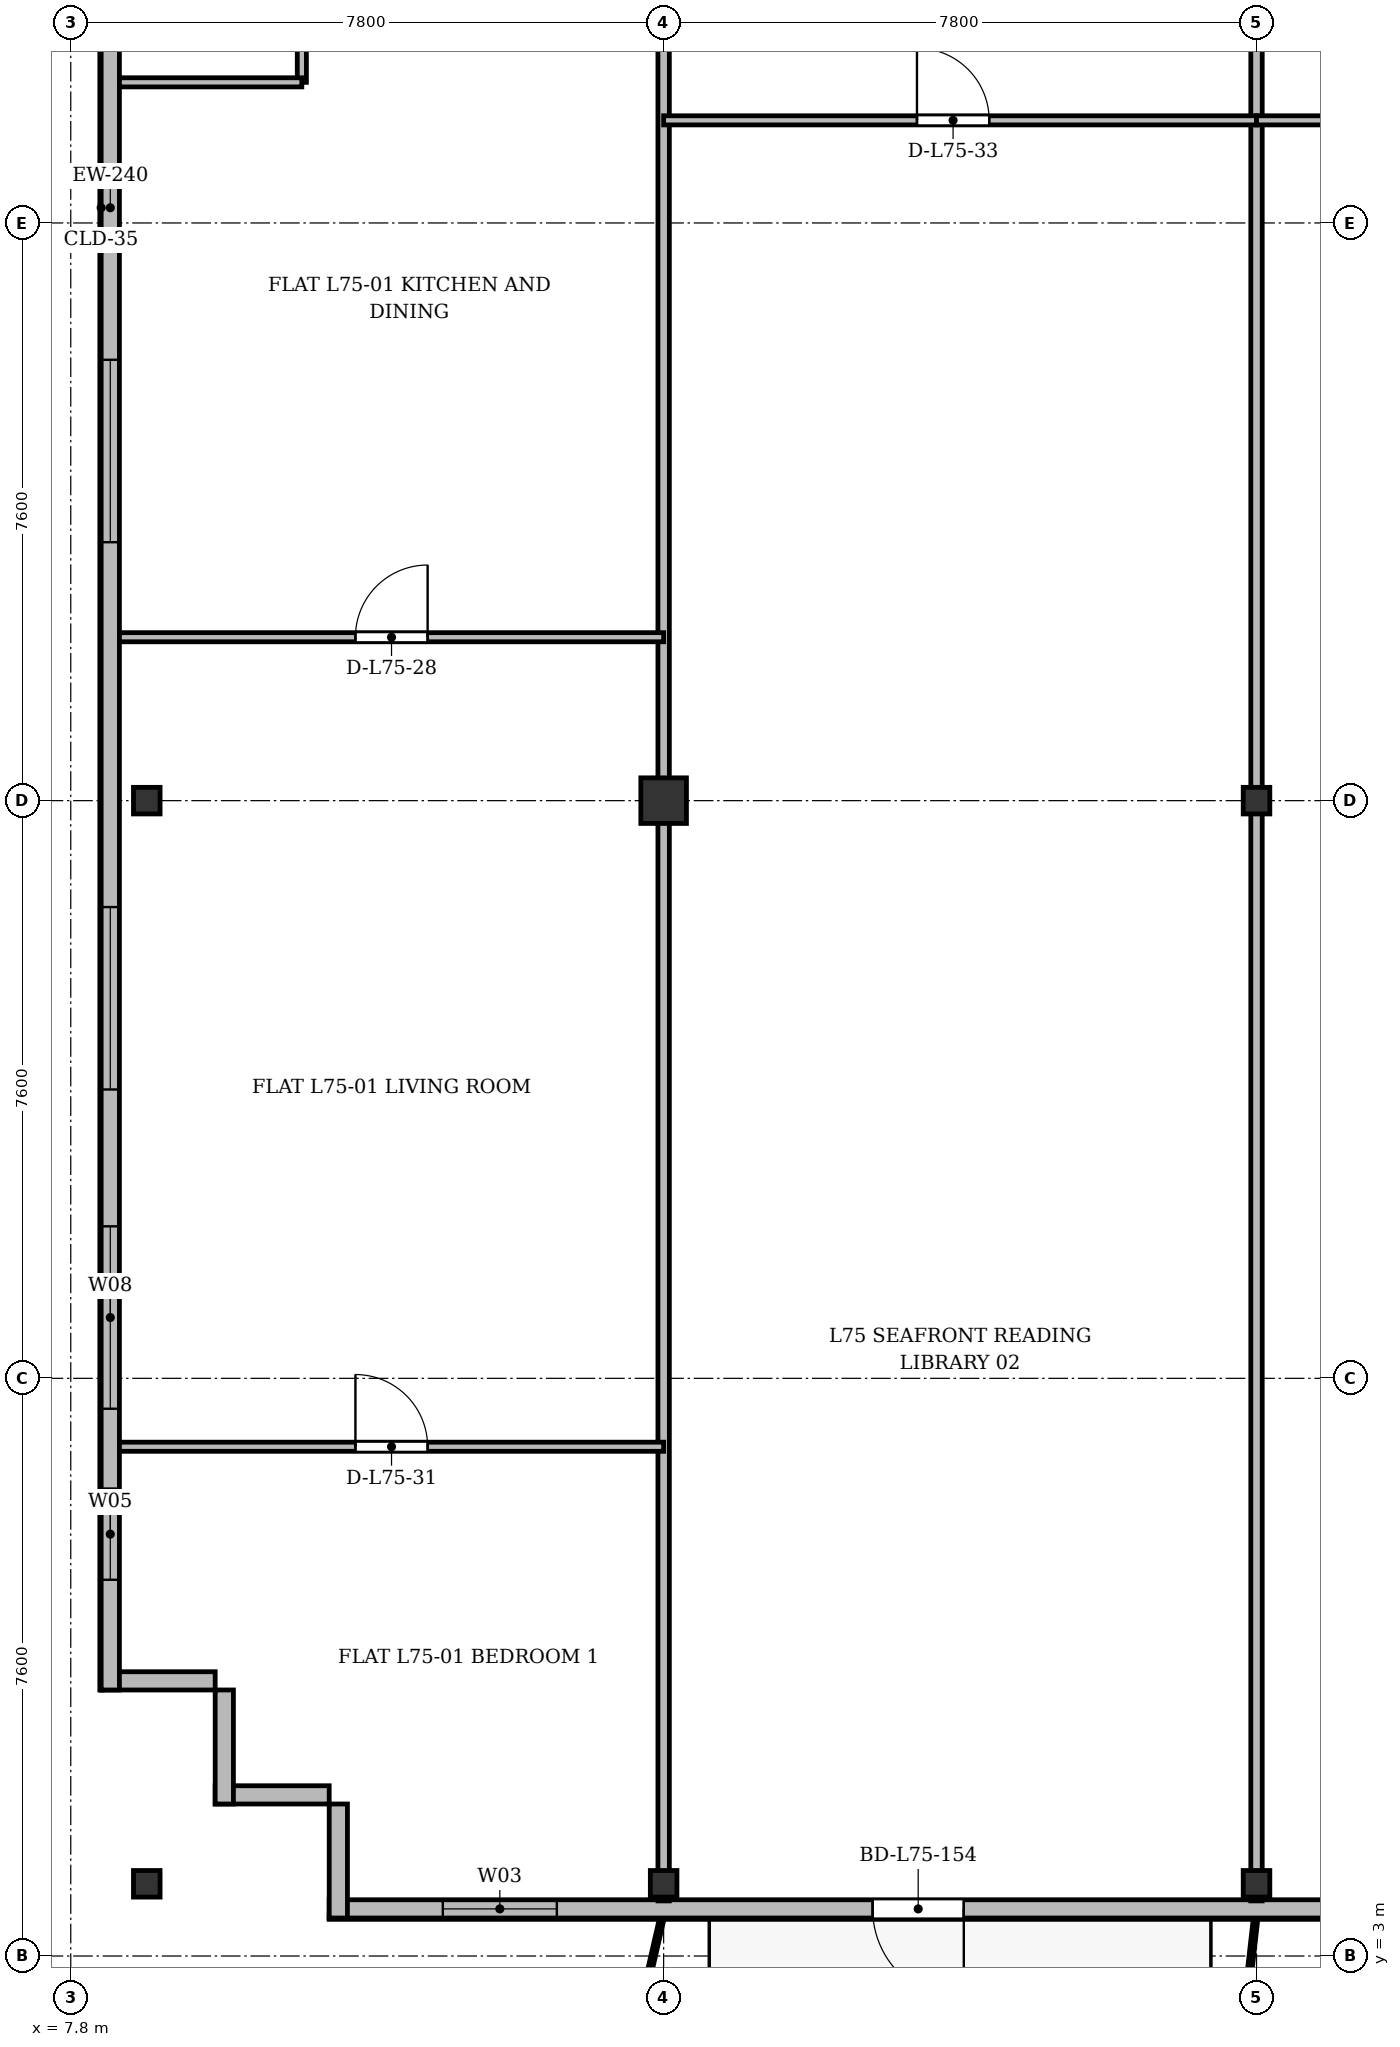
"""IFC4 building model, lengths in metres.
Left out: names, types, materials, properties, quantities, classifications, styles, units other than length and angle.
Written with IfcOpenShell. Run it as: python <this file> out.ifc"""

import sys

from ifc_helpers import new_model, si_unit, direction, frame, frame_2d, origin, origin_2d, place, context, subcontext, project, spatial, rectangle, i_section, extrude, source, transform, mapped, element, fill, save


model = new_model("IFC4")
c1 = context("Model", 3, precision=1e-05, world=origin(), true_north=direction((0.0, 1.0)))
c2 = subcontext(c1, "Body", "Model", "MODEL_VIEW")
j1 = project(units=[si_unit("LENGTHUNIT", "METRE"), si_unit("PLANEANGLEUNIT", "RADIAN")], contexts=[c1])
p1 = place(None, origin())
s1 = spatial("IfcSite", under=j1, at=p1, CompositionType="ELEMENT")
p2 = place(p1, origin())
s2 = spatial("IfcBuilding", under=s1, at=p2, CompositionType="ELEMENT")
p3 = place(p2, frame((0.0, 0.0, 288.3)))
s3 = spatial("IfcBuildingStorey", under=s2, at=p3, CompositionType="ELEMENT", Elevation=288.3)
m1 = source(origin(), c2, "Body", "SweptSolid", [
    extrude(i_section(OverallWidth=0.35, OverallDepth=0.35, WebThickness=0.018, FlangeThickness=0.028, at=origin_2d()), origin(), (0.0, 0.0, 1.0), 3.6),
])
for number, where, z_axis, x_axis in (
    (1, (8.8, 3.95, 0.0), (0.0, 0.0, 1.0), (1.0, 0.0, 0.0)),
    (2, (8.8, 18.2, 0.0), (0.0, 0.0, 1.0), (1.0, 0.0, 0.0)),
    (3, (15.6, 3.95, 0.0), (0.0, 0.0, 1.0), (1.0, 0.0, 0.0)),
):
    element("IfcColumn", number, at=place(p3, frame(where, z_axis=z_axis, x_axis=x_axis)), inside=s3, PredefinedType="COLUMN", context=c2, shape_type="MappedRepresentation", body=[
        mapped(m1, transform((0.0, 0.0, 0.0), x_axis=(1.0, 0.0, 0.0), y_axis=(0.0, 1.0, 0.0), z_axis=(0.0, 0.0, 1.0), scale=1.0)),
    ])
m2 = source(origin(), c2, "Body", "SweptSolid", [
    extrude(rectangle(XDim=0.6, YDim=0.6, at=origin_2d()), origin(), (0.0, 0.0, 1.0), 3.6),
])
p4 = place(p3, frame((15.6, 18.2, 0.0), z_axis=(0.0, 0.0, 1.0), x_axis=(1.0, 0.0, 0.0)))
e4 = element("IfcColumn", 4, at=p4, inside=s3, PredefinedType="COLUMN", context=c2, shape_type="MappedRepresentation", body=[
    mapped(m2, transform((0.0, 0.0, 0.0), x_axis=(1.0, 0.0, 0.0), y_axis=(0.0, 1.0, 0.0), z_axis=(0.0, 0.0, 1.0), scale=1.0)),
])
for number, where, z_axis, x_axis in (
    (5, (23.4, 3.95, 0.0), (0.0, 0.0, 1.0), (1.0, 0.0, 0.0)),
    (6, (23.4, 18.2, 0.0), (0.0, 0.0, 1.0), (1.0, 0.0, 0.0)),
):
    element("IfcColumn", number, at=place(p3, frame(where, z_axis=z_axis, x_axis=x_axis)), inside=s3, PredefinedType="COLUMN", context=c2, shape_type="MappedRepresentation", body=[
        mapped(m1, transform((0.0, 0.0, 0.0), x_axis=(1.0, 0.0, 0.0), y_axis=(0.0, 1.0, 0.0), z_axis=(0.0, 0.0, 1.0), scale=1.0)),
    ])
for number, where, z_axis, x_axis in (
    (7, (11.2, 5.12, 0.0), (0.0, 0.0, 1.0), (-1.0, 0.0, 0.0)),
    (8, (9.82, 5.0, 0.0), (0.0, 0.0, 1.0), (0.0, 1.0, 0.0)),
):
    element("IfcWall", number, at=place(p3, frame(where, z_axis=z_axis, x_axis=x_axis)), inside=s3, PredefinedType="SOLIDWALL", context=c2, shape_type="SweptSolid", body=[
        extrude(rectangle(XDim=1.5, YDim=0.24, at=frame_2d((0.75, 0.0))), origin(), (0.0, 0.0, 1.0), 3.37),
    ])
p5 = place(p3, frame((9.7, 6.62, 0.0), z_axis=(0.0, 0.0, 1.0), x_axis=(-1.0, 0.0, 0.0)))
e9 = element("IfcWall", 9, at=p5, inside=s3, PredefinedType="SOLIDWALL", context=c2, shape_type="SweptSolid", body=[
    extrude(rectangle(XDim=1.5, YDim=0.24, at=frame_2d((0.75, 0.0))), origin(), (0.0, 0.0, 1.0), 2.87),
])
p6 = place(p3, frame((8.32, 6.5, 0.0), z_axis=(0.0, 0.0, 1.0), x_axis=(0.0, 1.0, 0.0)))
e10 = element("IfcWall", 10, at=p6, inside=s3, PredefinedType="SOLIDWALL", context=c2, shape_type="SweptSolid", body=[
    extrude(rectangle(XDim=39.0, YDim=0.24, at=frame_2d((19.5, 0.0))), origin(), (0.0, 0.0, 1.0), 3.37),
])
p7 = place(p6, frame((1.45, 0.0, 0.92)))
e11 = element("IfcOpeningElement", 11, at=p7, cuts=e10, PredefinedType="OPENING", context=c2, shape_type="SweptSolid", body=[
    extrude(rectangle(XDim=1.2, YDim=1.65, at=frame_2d((0.6, 0.825))), frame((0.0, 0.13, 0.0), z_axis=(0.0, -1.0, 0.0), x_axis=(1.0, 0.0, 0.0)), (0.0, 0.0, 1.0), 0.26),
])
p8 = place(p6, frame((3.7, 0.0, 0.92)))
e12 = element("IfcOpeningElement", 12, at=p8, cuts=e10, PredefinedType="OPENING", context=c2, shape_type="SweptSolid", body=[
    extrude(rectangle(XDim=2.4, YDim=2.1, at=frame_2d((1.2, 1.05))), frame((0.0, 0.13, 0.0), z_axis=(0.0, -1.0, 0.0), x_axis=(1.0, 0.0, 0.0)), (0.0, 0.0, 1.0), 0.26),
])
p9 = place(p6, frame((7.9, 0.0, 0.92)))
e13 = element("IfcOpeningElement", 13, at=p9, cuts=e10, PredefinedType="OPENING", context=c2, shape_type="SweptSolid", body=[
    extrude(rectangle(XDim=2.4, YDim=2.1, at=frame_2d((1.2, 1.05))), frame((0.0, 0.13, 0.0), z_axis=(0.0, -1.0, 0.0), x_axis=(1.0, 0.0, 0.0)), (0.0, 0.0, 1.0), 0.26),
])
p10 = place(p6, frame((15.1, 0.0, 0.92)))
e14 = element("IfcOpeningElement", 14, at=p10, cuts=e10, PredefinedType="OPENING", context=c2, shape_type="SweptSolid", body=[
    extrude(rectangle(XDim=2.4, YDim=2.1, at=frame_2d((1.2, 1.05))), frame((0.0, 0.13, 0.0), z_axis=(0.0, -1.0, 0.0), x_axis=(1.0, 0.0, 0.0)), (0.0, 0.0, 1.0), 0.26),
])
p11 = place(p6, frame((29.1, 0.0, 0.92)))
e15 = element("IfcOpeningElement", 15, at=p11, cuts=e10, PredefinedType="OPENING", context=c2, shape_type="SweptSolid", body=[
    extrude(rectangle(XDim=2.4, YDim=2.1, at=frame_2d((1.2, 1.05))), frame((0.0, 0.13, 0.0), z_axis=(0.0, -1.0, 0.0), x_axis=(1.0, 0.0, 0.0)), (0.0, 0.0, 1.0), 0.26),
])
p12 = place(p6, frame((33.3, 0.0, 0.92)))
e16 = element("IfcOpeningElement", 16, at=p12, cuts=e10, PredefinedType="OPENING", context=c2, shape_type="SweptSolid", body=[
    extrude(rectangle(XDim=1.2, YDim=1.65, at=frame_2d((0.6, 0.825))), frame((0.0, 0.13, 0.0), z_axis=(0.0, -1.0, 0.0), x_axis=(1.0, 0.0, 0.0)), (0.0, 0.0, 1.0), 0.26),
])
p13 = place(p6, frame((36.65, 0.0, 0.92)))
e17 = element("IfcOpeningElement", 17, at=p13, cuts=e10, PredefinedType="OPENING", context=c2, shape_type="SweptSolid", body=[
    extrude(rectangle(XDim=1.2, YDim=1.65, at=frame_2d((0.6, 0.825))), frame((0.0, 0.13, 0.0), z_axis=(0.0, -1.0, 0.0), x_axis=(1.0, 0.0, 0.0)), (0.0, 0.0, 1.0), 0.26),
])
p14 = place(p3, frame((31.4, 3.62, 0.0), z_axis=(0.0, 0.0, 1.0), x_axis=(-1.0, 0.0, 0.0)))
e18 = element("IfcWall", 18, at=p14, inside=s3, PredefinedType="SOLIDWALL", context=c2, shape_type="SweptSolid", body=[
    extrude(rectangle(XDim=20.2, YDim=0.24, at=frame_2d((10.1, 0.0))), origin(), (0.0, 0.0, 1.0), 3.37),
])
p15 = place(p14, frame((3.145, 0.0, 0.9)))
e19 = element("IfcOpeningElement", 19, at=p15, cuts=e18, PredefinedType="OPENING", context=c2, shape_type="SweptSolid", body=[
    extrude(rectangle(XDim=1.8, YDim=1.8, at=frame_2d((0.9, 0.9))), frame((0.0, 0.13, 0.0), z_axis=(0.0, -1.0, 0.0), x_axis=(1.0, 0.0, 0.0)), (0.0, 0.0, 1.0), 0.26),
])
p16 = place(p14, frame((11.851, 0.0, 0.0)))
e20 = element("IfcOpeningElement", 20, at=p16, cuts=e18, PredefinedType="OPENING", context=c2, shape_type="SweptSolid", body=[
    extrude(rectangle(XDim=1.2, YDim=2.2, at=frame_2d((0.6, 1.1))), frame((0.0, 0.13, 0.0), z_axis=(0.0, -1.0, 0.0), x_axis=(1.0, 0.0, 0.0)), (0.0, 0.0, 1.0), 0.26),
])
p17 = place(p14, frame((17.205, 0.0, 0.9)))
e21 = element("IfcOpeningElement", 21, at=p17, cuts=e18, PredefinedType="OPENING", context=c2, shape_type="SweptSolid", body=[
    extrude(rectangle(XDim=1.5, YDim=1.75, at=frame_2d((0.75, 0.875))), frame((0.0, 0.13, 0.0), z_axis=(0.0, -1.0, 0.0), x_axis=(1.0, 0.0, 0.0)), (0.0, 0.0, 1.0), 0.26),
])
p18 = place(p3, frame((11.32, 3.5, 0.0), z_axis=(0.0, 0.0, 1.0), x_axis=(0.0, 1.0, 0.0)))
e22 = element("IfcWall", 22, at=p18, inside=s3, PredefinedType="SOLIDWALL", context=c2, shape_type="SweptSolid", body=[
    extrude(rectangle(XDim=1.5, YDim=0.24, at=frame_2d((0.75, 0.0))), origin(), (0.0, 0.0, 1.0), 2.92),
])
for number, where, z_axis, x_axis in (
    (23, (15.6, 3.725, 0.0), (0.0, 0.0, 1.0), (0.0, 1.0, 0.0)),
    (24, (23.4, 3.725, 0.0), (0.0, 0.0, 1.0), (0.0, 1.0, 0.0)),
):
    element("IfcWall", number, at=place(p3, frame(where, z_axis=z_axis, x_axis=x_axis)), inside=s3, PredefinedType="PARTITIONING", context=c2, shape_type="SweptSolid", body=[
        extrude(rectangle(XDim=27.275, YDim=0.15, at=frame_2d((13.637, 0.0))), origin(), (0.0, 0.0, 1.0), 2.87),
    ])
p19 = place(p3, frame((8.44, 20.35, 0.0), z_axis=(0.0, 0.0, 1.0), x_axis=(1.0, 0.0, 0.0)))
e25 = element("IfcWall", 25, at=p19, inside=s3, PredefinedType="PARTITIONING", context=c2, shape_type="SweptSolid", body=[
    extrude(rectangle(XDim=7.16, YDim=0.12, at=frame_2d((3.58, 0.0))), origin(), (0.0, 0.0, 1.0), 2.87),
])
p20 = place(p19, frame((3.105, 0.0, 0.0)))
e26 = element("IfcOpeningElement", 26, at=p20, cuts=e25, PredefinedType="OPENING", context=c2, shape_type="SweptSolid", body=[
    extrude(rectangle(XDim=0.95, YDim=2.15, at=frame_2d((0.475, 1.075))), frame((0.0, 0.07, 0.0), z_axis=(0.0, -1.0, 0.0), x_axis=(1.0, 0.0, 0.0)), (0.0, 0.0, 1.0), 0.14),
])
p21 = place(p3, frame((10.84, 27.65, 0.0), z_axis=(0.0, 0.0, 1.0), x_axis=(0.0, 1.0, 0.0)))
e27 = element("IfcWall", 27, at=p21, inside=s3, PredefinedType="PARTITIONING", context=c2, shape_type="SweptSolid", body=[
    extrude(rectangle(XDim=3.35, YDim=0.12, at=frame_2d((1.675, 0.0))), origin(), (0.0, 0.0, 1.0), 3.37),
])
p22 = place(p21, frame((0.8, 0.0, 0.0)))
e28 = element("IfcOpeningElement", 28, at=p22, cuts=e27, PredefinedType="OPENING", context=c2, shape_type="SweptSolid", body=[
    extrude(rectangle(XDim=0.85, YDim=2.1, at=frame_2d((0.425, 1.05))), frame((0.0, 0.07, 0.0), z_axis=(0.0, -1.0, 0.0), x_axis=(1.0, 0.0, 0.0)), (0.0, 0.0, 1.0), 0.14),
])
p23 = place(p3, frame((8.44, 27.65, 0.0), z_axis=(0.0, 0.0, 1.0), x_axis=(1.0, 0.0, 0.0)))
e29 = element("IfcWall", 29, at=p23, inside=s3, PredefinedType="PARTITIONING", context=c2, shape_type="SweptSolid", body=[
    extrude(rectangle(XDim=2.4, YDim=0.12, at=frame_2d((1.2, 0.0))), origin(), (0.0, 0.0, 1.0), 2.87),
])
p24 = place(p3, frame((8.44, 9.7, 0.0), z_axis=(0.0, 0.0, 1.0), x_axis=(1.0, 0.0, 0.0)))
e30 = element("IfcWall", 30, at=p24, inside=s3, PredefinedType="PARTITIONING", context=c2, shape_type="SweptSolid", body=[
    extrude(rectangle(XDim=7.16, YDim=0.12, at=frame_2d((3.58, 0.0))), origin(), (0.0, 0.0, 1.0), 2.87),
])
p25 = place(p24, frame((3.105, 0.0, 0.0)))
e31 = element("IfcOpeningElement", 31, at=p25, cuts=e30, PredefinedType="OPENING", context=c2, shape_type="SweptSolid", body=[
    extrude(rectangle(XDim=0.95, YDim=2.15, at=frame_2d((0.475, 1.075))), frame((0.0, 0.07, 0.0), z_axis=(0.0, -1.0, 0.0), x_axis=(1.0, 0.0, 0.0)), (0.0, 0.0, 1.0), 0.14),
])
p26 = place(p3, frame((15.6, 27.15, 0.0), z_axis=(0.0, 0.0, 1.0), x_axis=(1.0, 0.0, 0.0)))
e32 = element("IfcWall", 32, at=p26, inside=s3, PredefinedType="PARTITIONING", context=c2, shape_type="SweptSolid", body=[
    extrude(rectangle(XDim=7.8, YDim=0.12, at=frame_2d((3.9, 0.0))), origin(), (0.0, 0.0, 1.0), 2.87),
])
p27 = place(p26, frame((3.333, 0.0, 0.0)))
e33 = element("IfcOpeningElement", 33, at=p27, cuts=e32, PredefinedType="OPENING", context=c2, shape_type="SweptSolid", body=[
    extrude(rectangle(XDim=0.95, YDim=2.15, at=frame_2d((0.475, 1.075))), frame((0.0, 0.07, 0.0), z_axis=(0.0, -1.0, 0.0), x_axis=(1.0, 0.0, 0.0)), (0.0, 0.0, 1.0), 0.14),
])
p28 = place(p3, frame((23.4, 27.15, 0.0), z_axis=(0.0, 0.0, 1.0), x_axis=(1.0, 0.0, 0.0)))
e34 = element("IfcWall", 34, at=p28, inside=s3, PredefinedType="PARTITIONING", context=c2, shape_type="SweptSolid", body=[
    extrude(rectangle(XDim=9.8, YDim=0.12, at=frame_2d((4.9, 0.0))), origin(), (0.0, 0.0, 1.0), 2.87),
])
p29 = place(p28, frame((4.425, 0.0, 0.0)))
e35 = element("IfcOpeningElement", 35, at=p29, cuts=e34, PredefinedType="OPENING", context=c2, shape_type="SweptSolid", body=[
    extrude(rectangle(XDim=0.95, YDim=2.15, at=frame_2d((0.475, 1.075))), frame((0.0, 0.07, 0.0), z_axis=(0.0, -1.0, 0.0), x_axis=(1.0, 0.0, 0.0)), (0.0, 0.0, 1.0), 0.14),
])
m3 = source(origin(), c2, "Body", "SweptSolid", [
    extrude(rectangle(XDim=1.2, YDim=1.65, at=frame_2d((0.6, 0.825))), frame((0.0, 0.03, 0.0), z_axis=(0.0, -1.0, 0.0), x_axis=(1.0, 0.0, 0.0)), (0.0, 0.0, 1.0), 0.06),
])
p30 = place(p7, origin())
e36 = element("IfcWindow", 36, at=p30, inside=s3, PartitioningType="SINGLE_PANEL", PredefinedType="WINDOW", context=c2, shape_type="MappedRepresentation", body=[
    mapped(m3, transform((0.0, 0.0, 0.0), x_axis=(1.0, 0.0, 0.0), y_axis=(0.0, 1.0, 0.0), z_axis=(0.0, 0.0, 1.0), scale=1.0)),
])
fill(e11, e36)
m4 = source(origin(), c2, "Body", "SweptSolid", [
    extrude(rectangle(XDim=2.4, YDim=2.1, at=frame_2d((1.2, 1.05))), frame((0.0, 0.03, 0.0), z_axis=(0.0, -1.0, 0.0), x_axis=(1.0, 0.0, 0.0)), (0.0, 0.0, 1.0), 0.06),
])
p31 = place(p8, origin())
e37 = element("IfcWindow", 37, at=p31, inside=s3, PartitioningType="SINGLE_PANEL", PredefinedType="WINDOW", context=c2, shape_type="MappedRepresentation", body=[
    mapped(m4, transform((0.0, 0.0, 0.0), x_axis=(1.0, 0.0, 0.0), y_axis=(0.0, 1.0, 0.0), z_axis=(0.0, 0.0, 1.0), scale=1.0)),
])
fill(e12, e37)
p32 = place(p9, origin())
e38 = element("IfcWindow", 38, at=p32, inside=s3, PartitioningType="SINGLE_PANEL", PredefinedType="WINDOW", context=c2, shape_type="MappedRepresentation", body=[
    mapped(m4, transform((0.0, 0.0, 0.0), x_axis=(1.0, 0.0, 0.0), y_axis=(0.0, 1.0, 0.0), z_axis=(0.0, 0.0, 1.0), scale=1.0)),
])
fill(e13, e38)
p33 = place(p10, origin())
e39 = element("IfcWindow", 39, at=p33, inside=s3, PartitioningType="SINGLE_PANEL", PredefinedType="WINDOW", context=c2, shape_type="MappedRepresentation", body=[
    mapped(m4, transform((0.0, 0.0, 0.0), x_axis=(1.0, 0.0, 0.0), y_axis=(0.0, 1.0, 0.0), z_axis=(0.0, 0.0, 1.0), scale=1.0)),
])
fill(e14, e39)
m5 = source(origin(), c2, "Body", "SweptSolid", [
    extrude(rectangle(XDim=1.2, YDim=2.2, at=frame_2d((0.6, 1.1))), frame((0.0, 0.025, 0.0), z_axis=(0.0, -1.0, 0.0), x_axis=(1.0, 0.0, 0.0)), (0.0, 0.0, 1.0), 0.05),
])
p34 = place(p16, origin())
e40 = element("IfcDoor", 40, at=p34, inside=s3, OperationType="SINGLE_SWING_LEFT", PredefinedType="DOOR", context=c2, shape_type="MappedRepresentation", body=[
    mapped(m5, transform((0.0, 0.0, 0.0), x_axis=(1.0, 0.0, 0.0), y_axis=(0.0, 1.0, 0.0), z_axis=(0.0, 0.0, 1.0), scale=1.0)),
])
fill(e20, e40)
m6 = source(origin(), c2, "Body", "SweptSolid", [
    extrude(rectangle(XDim=1.5, YDim=1.75, at=frame_2d((0.75, 0.875))), frame((0.0, 0.03, 0.0), z_axis=(0.0, -1.0, 0.0), x_axis=(1.0, 0.0, 0.0)), (0.0, 0.0, 1.0), 0.06),
])
p35 = place(p17, origin())
e41 = element("IfcWindow", 41, at=p35, inside=s3, PartitioningType="SINGLE_PANEL", PredefinedType="WINDOW", context=c2, shape_type="MappedRepresentation", body=[
    mapped(m6, transform((0.0, 0.0, 0.0), x_axis=(1.0, 0.0, 0.0), y_axis=(0.0, 1.0, 0.0), z_axis=(0.0, 0.0, 1.0), scale=1.0)),
])
fill(e21, e41)
m7 = source(origin(), c2, "Body", "SweptSolid", [
    extrude(rectangle(XDim=0.95, YDim=2.15, at=frame_2d((0.475, 1.075))), frame((0.0, 0.025, 0.0), z_axis=(0.0, -1.0, 0.0), x_axis=(1.0, 0.0, 0.0)), (0.0, 0.0, 1.0), 0.05),
])
p36 = place(p20, origin())
e42 = element("IfcDoor", 42, at=p36, inside=s3, OperationType="SINGLE_SWING_RIGHT", PredefinedType="DOOR", context=c2, shape_type="MappedRepresentation", body=[
    mapped(m7, transform((0.0, 0.0, 0.0), x_axis=(1.0, 0.0, 0.0), y_axis=(0.0, 1.0, 0.0), z_axis=(0.0, 0.0, 1.0), scale=1.0)),
])
fill(e26, e42)
p37 = place(p25, origin())
e43 = element("IfcDoor", 43, at=p37, inside=s3, OperationType="SINGLE_SWING_LEFT", PredefinedType="DOOR", context=c2, shape_type="MappedRepresentation", body=[
    mapped(m7, transform((0.0, 0.0, 0.0), x_axis=(1.0, 0.0, 0.0), y_axis=(0.0, 1.0, 0.0), z_axis=(0.0, 0.0, 1.0), scale=1.0)),
])
fill(e31, e43)
p38 = place(p27, origin())
e44 = element("IfcDoor", 44, at=p38, inside=s3, OperationType="SINGLE_SWING_LEFT", PredefinedType="DOOR", context=c2, shape_type="MappedRepresentation", body=[
    mapped(m7, transform((0.0, 0.0, 0.0), x_axis=(1.0, 0.0, 0.0), y_axis=(0.0, 1.0, 0.0), z_axis=(0.0, 0.0, 1.0), scale=1.0)),
])
fill(e33, e44)
save(model, sys.argv[1])
